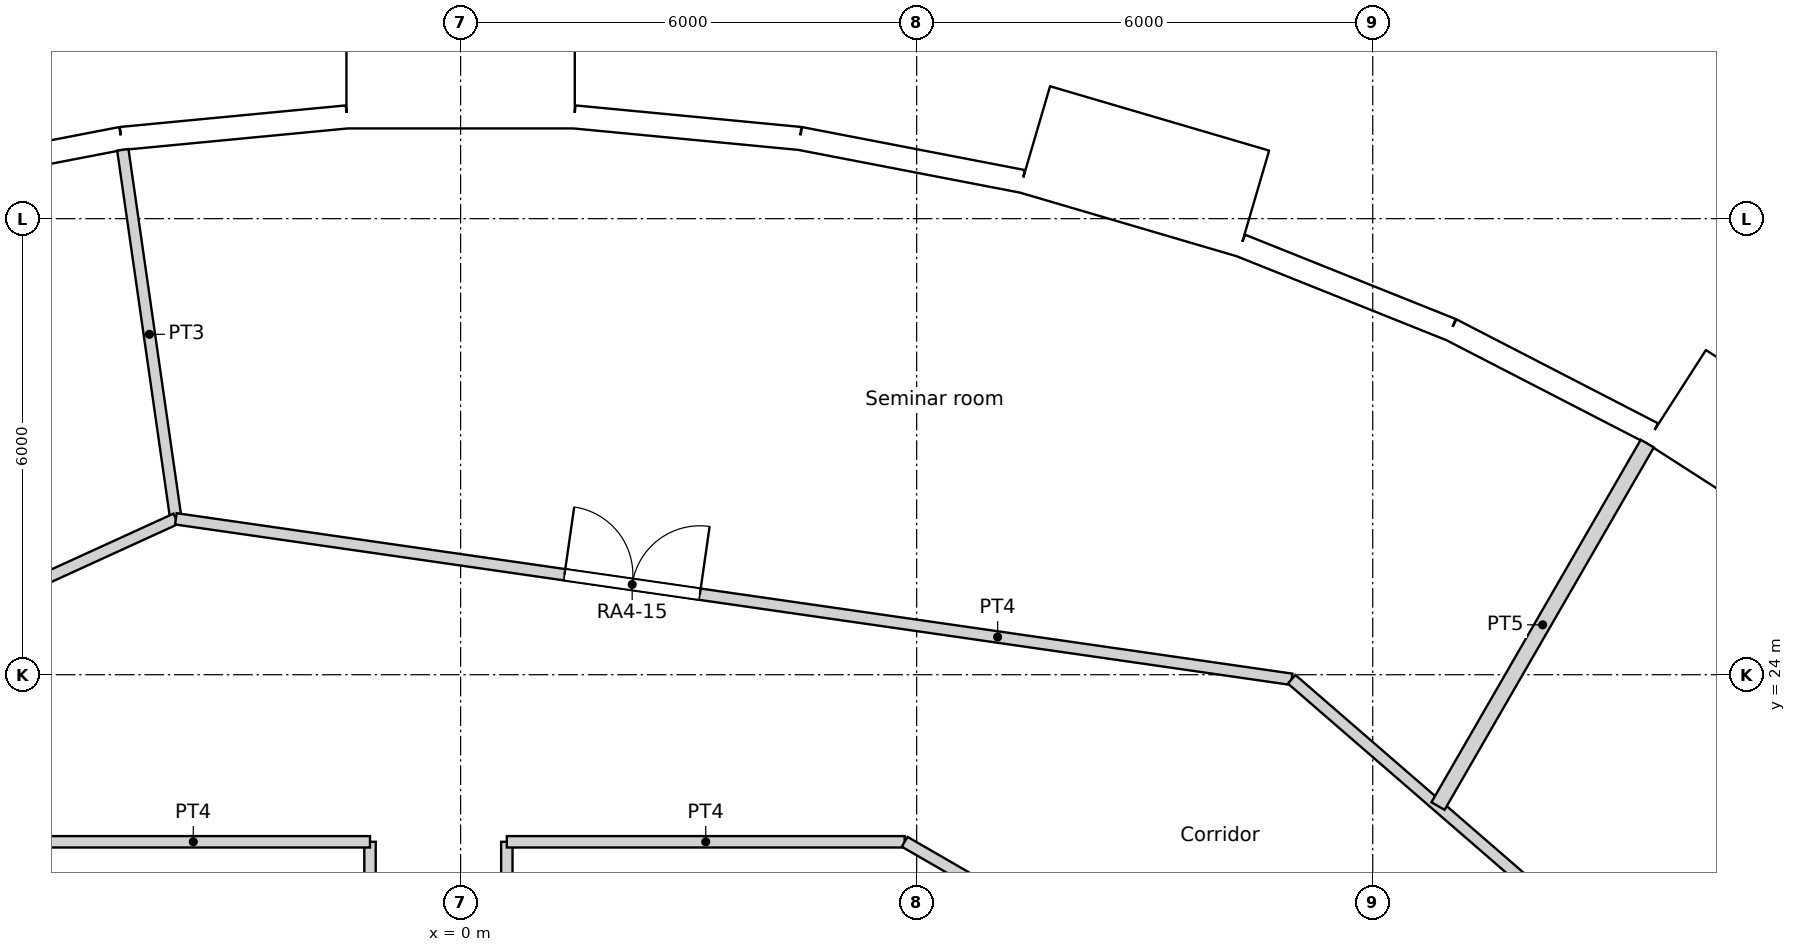
"""IFC4 building model, lengths in metres.
Left out: names, types, materials, properties, quantities, classifications, styles, units other than length and angle.
Written with IfcOpenShell. Run it as: python <this file> out.ifc"""

import sys

from ifc_helpers import new_model, si_unit, direction, frame, frame_2d, origin, origin_2d, place, context, subcontext, project, spatial, rectangle, circle, extrude, element, fill, save


model = new_model("IFC4")
c1 = context("Model", 3, precision=1e-05, world=origin(), true_north=direction((0.0, 1.0)))
c2 = subcontext(c1, "Body", "Model", "MODEL_VIEW")
j1 = project(units=[si_unit("LENGTHUNIT", "METRE"), si_unit("PLANEANGLEUNIT", "RADIAN")], contexts=[c1])
p1 = place(None, origin())
s1 = spatial("IfcSite", under=j1, at=p1, CompositionType="ELEMENT")
p2 = place(p1, origin())
s2 = spatial("IfcBuilding", under=s1, at=p2, CompositionType="ELEMENT")
p3 = place(p2, frame((0.0, 0.0, 60.6)))
s3 = spatial("IfcBuildingStorey", under=s2, at=p3, CompositionType="ELEMENT", Elevation=60.6)
for number, where, z_axis, x_axis in (
    (1, (12.576, 27.539, 0.0), (0.0, 0.0, 1.0), (1.0, 0.0, 0.0)),
    (2, (7.137, 29.421, 0.0), (0.0, 0.0, 1.0), (1.0, 0.0, 0.0)),
    (3, (1.44, 30.24, 0.0), (0.0, 0.0, 1.0), (1.0, 0.0, 0.0)),
    (4, (-4.309, 29.966, 0.0), (0.0, 0.0, 1.0), (1.0, 0.0, 0.0)),
):
    element("IfcColumn", number, at=place(p3, frame(where, z_axis=z_axis, x_axis=x_axis)), inside=s3, PredefinedType="COLUMN", context=c2, shape_type="SweptSolid", body=[
        extrude(circle(Radius=0.7, at=origin_2d()), origin(), (0.0, 0.0, 1.0), 3.6),
    ])
for number, where, z_axis, x_axis in (
    (5, (9.723, 22.54, 0.0), (0.0, 0.0, 1.0), (1.0, 0.0, 0.0)),
    (6, (4.263, 24.175, 0.0), (0.0, 0.0, 1.0), (1.0, 0.0, 0.0)),
    (7, (-1.427, 24.506, 0.0), (0.0, 0.0, 1.0), (1.0, 0.0, 0.0)),
):
    element("IfcColumn", number, at=place(p3, frame(where, z_axis=z_axis, x_axis=x_axis)), inside=s3, PredefinedType="COLUMN", context=c2, shape_type="SweptSolid", body=[
        extrude(circle(Radius=0.75, at=origin_2d()), origin(), (0.0, 0.0, 1.0), 3.6),
    ])
p4 = place(p3, frame((18.516, 26.037, -0.45), z_axis=(0.0, 0.0, 1.0), x_axis=(-0.841223422347, 0.540687667415, 0.0)))
e8 = element("IfcWall", 8, at=p4, inside=s3, PredefinedType="ELEMENTEDWALL", context=c2, shape_type="SweptSolid", body=[
    extrude(rectangle(XDim=3.0, YDim=1.45, at=frame_2d((1.5, 0.0))), origin(), (0.0, 0.0, 1.0), 3.6),
])
p5 = place(p4, frame((1.5, 0.0, 2.0)))
e9 = element("IfcOpeningElement", 9, at=p5, cuts=e8, PredefinedType="OPENING", context=c2, shape_type="SweptSolid", body=[
    extrude(circle(Radius=0.9, at=origin_2d()), frame((0.0, 0.735, 0.0), z_axis=(0.0, -1.0, 0.0), x_axis=(1.0, 0.0, 0.0)), (0.0, 0.0, 1.0), 1.47),
])
p6 = place(p3, frame((15.682, 27.174, 0.0), z_axis=(0.0, 0.0, 1.0), x_axis=(-0.888819853856, 0.458256770153, 0.0)))
e10 = element("IfcWall", 10, at=p6, inside=s3, PredefinedType="SOLIDWALL", context=c2, shape_type="SweptSolid", body=[
    extrude(rectangle(XDim=2.98, YDim=0.3, at=frame_2d((1.49, 0.0))), origin(), (0.0, 0.0, 1.0), 2.65),
])
p7 = place(p6, frame((1.49, 0.0, 1.55)))
e11 = element("IfcOpeningElement", 11, at=p7, cuts=e10, PredefinedType="OPENING", context=c2, shape_type="SweptSolid", body=[
    extrude(circle(Radius=0.9, at=origin_2d()), frame((0.0, 0.16, 0.0), z_axis=(0.0, -1.0, 0.0), x_axis=(1.0, 0.0, 0.0)), (0.0, 0.0, 1.0), 0.32),
])
p8 = place(p3, frame((13.033, 28.539, 0.0), z_axis=(0.0, 0.0, 1.0), x_axis=(-0.928403213937, 0.371574316054, 0.0)))
e12 = element("IfcWall", 12, at=p8, inside=s3, PredefinedType="SOLIDWALL", context=c2, shape_type="SweptSolid", body=[
    extrude(rectangle(XDim=2.98, YDim=0.3, at=frame_2d((1.49, 0.0))), origin(), (0.0, 0.0, 1.0), 3.15),
])
p9 = place(p8, frame((1.49, 0.0, 1.55)))
e13 = element("IfcOpeningElement", 13, at=p9, cuts=e12, PredefinedType="OPENING", context=c2, shape_type="SweptSolid", body=[
    extrude(circle(Radius=0.9, at=origin_2d()), frame((0.0, 0.16, 0.0), z_axis=(0.0, -1.0, 0.0), x_axis=(1.0, 0.0, 0.0)), (0.0, 0.0, 1.0), 0.32),
])
p10 = place(p3, frame((10.43, 30.198, -0.45), z_axis=(0.0, 0.0, 1.0), x_axis=(-0.959489813418, 0.281743319258, 0.0)))
e14 = element("IfcWall", 14, at=p10, inside=s3, PredefinedType="ELEMENTEDWALL", context=c2, shape_type="SweptSolid", body=[
    extrude(rectangle(XDim=3.0, YDim=1.45, at=frame_2d((1.5, 0.0))), origin(), (0.0, 0.0, 1.0), 3.6),
])
p11 = place(p10, frame((1.5, 0.0, 2.0)))
e15 = element("IfcOpeningElement", 15, at=p11, cuts=e14, PredefinedType="OPENING", context=c2, shape_type="SweptSolid", body=[
    extrude(circle(Radius=0.9, at=origin_2d()), frame((0.0, 0.735, 0.0), z_axis=(0.0, -1.0, 0.0), x_axis=(1.0, 0.0, 0.0)), (0.0, 0.0, 1.0), 1.47),
])
p12 = place(p3, frame((7.391, 30.491, 0.0), z_axis=(0.0, 0.0, 1.0), x_axis=(-0.981924535406, 0.189272836848, 0.0)))
e16 = element("IfcWall", 16, at=p12, inside=s3, PredefinedType="SOLIDWALL", context=c2, shape_type="SweptSolid", body=[
    extrude(rectangle(XDim=2.98, YDim=0.3, at=frame_2d((1.49, 0.0))), origin(), (0.0, 0.0, 1.0), 2.65),
])
p13 = place(p12, frame((1.49, 0.0, 1.55)))
e17 = element("IfcOpeningElement", 17, at=p13, cuts=e16, PredefinedType="OPENING", context=c2, shape_type="SweptSolid", body=[
    extrude(circle(Radius=0.9, at=origin_2d()), frame((0.0, 0.16, 0.0), z_axis=(0.0, -1.0, 0.0), x_axis=(1.0, 0.0, 0.0)), (0.0, 0.0, 1.0), 0.32),
])
p14 = place(p3, frame((4.465, 31.055, 0.0), z_axis=(0.0, 0.0, 1.0), x_axis=(-0.995473351551, 0.095041077185, 0.0)))
e18 = element("IfcWall", 18, at=p14, inside=s3, PredefinedType="SOLIDWALL", context=c2, shape_type="SweptSolid", body=[
    extrude(rectangle(XDim=2.98, YDim=0.3, at=frame_2d((1.49, 0.0))), origin(), (0.0, 0.0, 1.0), 3.15),
])
p15 = place(p14, frame((1.49, 0.0, 1.55)))
e19 = element("IfcOpeningElement", 19, at=p15, cuts=e18, PredefinedType="OPENING", context=c2, shape_type="SweptSolid", body=[
    extrude(circle(Radius=0.9, at=origin_2d()), frame((0.0, 0.16, 0.0), z_axis=(0.0, -1.0, 0.0), x_axis=(1.0, 0.0, 0.0)), (0.0, 0.0, 1.0), 0.32),
])
p16 = place(p3, frame((1.5, 31.914, -0.45), z_axis=(0.0, 0.0, 1.0), x_axis=(-1.0, 0.0, 0.0)))
e20 = element("IfcWall", 20, at=p16, inside=s3, PredefinedType="ELEMENTEDWALL", context=c2, shape_type="SweptSolid", body=[
    extrude(rectangle(XDim=3.0, YDim=1.45, at=frame_2d((1.5, 0.0))), origin(), (0.0, 0.0, 1.0), 3.6),
])
p17 = place(p16, frame((1.5, 0.0, 2.0)))
e21 = element("IfcOpeningElement", 21, at=p17, cuts=e20, PredefinedType="OPENING", context=c2, shape_type="SweptSolid", body=[
    extrude(circle(Radius=0.9, at=origin_2d()), frame((0.0, 0.735, 0.0), z_axis=(0.0, -1.0, 0.0), x_axis=(1.0, 0.0, 0.0)), (0.0, 0.0, 1.0), 1.47),
])
p18 = place(p3, frame((-1.499, 31.338, 0.0), z_axis=(0.0, 0.0, 1.0), x_axis=(-0.995473351551, -0.095041077185, 0.0)))
e22 = element("IfcWall", 22, at=p18, inside=s3, PredefinedType="SOLIDWALL", context=c2, shape_type="SweptSolid", body=[
    extrude(rectangle(XDim=2.98, YDim=0.3, at=frame_2d((1.49, 0.0))), origin(), (0.0, 0.0, 1.0), 2.65),
])
p19 = place(p18, frame((1.49, 0.0, 1.55)))
e23 = element("IfcOpeningElement", 23, at=p19, cuts=e22, PredefinedType="OPENING", context=c2, shape_type="SweptSolid", body=[
    extrude(circle(Radius=0.9, at=origin_2d()), frame((0.0, 0.16, 0.0), z_axis=(0.0, -1.0, 0.0), x_axis=(1.0, 0.0, 0.0)), (0.0, 0.0, 1.0), 0.32),
])
p20 = place(p3, frame((-4.465, 31.055, 0.0), z_axis=(0.0, 0.0, 1.0), x_axis=(-0.981924535406, -0.189272836848, 0.0)))
e24 = element("IfcWall", 24, at=p20, inside=s3, PredefinedType="SOLIDWALL", context=c2, shape_type="SweptSolid", body=[
    extrude(rectangle(XDim=2.98, YDim=0.3, at=frame_2d((1.49, 0.0))), origin(), (0.0, 0.0, 1.0), 3.15),
])
p21 = place(p20, frame((1.49, 0.0, 1.55)))
e25 = element("IfcOpeningElement", 25, at=p21, cuts=e24, PredefinedType="OPENING", context=c2, shape_type="SweptSolid", body=[
    extrude(circle(Radius=0.9, at=origin_2d()), frame((0.0, 0.16, 0.0), z_axis=(0.0, -1.0, 0.0), x_axis=(1.0, 0.0, 0.0)), (0.0, 0.0, 1.0), 0.32),
])
p22 = place(p3, frame((10.933, 23.94, 0.0), z_axis=(0.0, 0.0, 1.0), x_axis=(0.755770011705, -0.654837147242, 0.0)))
e26 = element("IfcWall", 26, at=p22, inside=s3, PredefinedType="PARTITIONING", context=c2, shape_type="SweptSolid", body=[
    extrude(rectangle(XDim=14.83, YDim=0.15, at=frame_2d((7.415, 0.0))), origin(), (0.0, 0.0, 1.0), 3.15),
])
p23 = place(p22, frame((6.807, 0.0, 0.0)))
e27 = element("IfcOpeningElement", 27, at=p23, cuts=e26, PredefinedType="OPENING", context=c2, shape_type="SweptSolid", body=[
    extrude(rectangle(XDim=0.95, YDim=2.1, at=frame_2d((0.475, 1.05))), frame((0.0, 0.075, 0.0), z_axis=(0.0, -1.0, 0.0), x_axis=(1.0, 0.0, 0.0)), (0.0, 0.0, 1.0), 0.15),
])
p24 = place(p3, frame((-1.192, 11.8, 0.0), z_axis=(0.0, 0.0, 1.0), x_axis=(0.0, 1.0, 0.0)))
e28 = element("IfcWall", 28, at=p24, inside=s3, PredefinedType="PARTITIONING", context=c2, shape_type="SweptSolid", body=[
    extrude(rectangle(XDim=10.002, YDim=0.15, at=frame_2d((5.001, 0.0))), origin(), (0.0, 0.0, 1.0), 3.15),
])
p25 = place(p3, frame((-5.842, 21.802, 0.0), z_axis=(0.0, 0.0, 1.0), x_axis=(1.0, 0.0, 0.0)))
e29 = element("IfcWall", 29, at=p25, inside=s3, PredefinedType="PARTITIONING", context=c2, shape_type="SweptSolid", body=[
    extrude(rectangle(XDim=4.65, YDim=0.15, at=frame_2d((2.325, 0.0))), origin(), (0.0, 0.0, 1.0), 3.15),
])
p26 = place(p3, frame((5.842, 21.802, 0.0), z_axis=(0.0, 0.0, 1.0), x_axis=(0.865983505205, -0.500072563448, 0.0)))
e30 = element("IfcWall", 30, at=p26, inside=s3, PredefinedType="PARTITIONING", context=c2, shape_type="SweptSolid", body=[
    extrude(rectangle(XDim=4.265, YDim=0.15, at=frame_2d((2.133, 0.0))), origin(), (0.0, 0.0, 1.0), 3.15),
])
p27 = place(p3, frame((0.608, 21.802, 0.0), z_axis=(0.0, 0.0, 1.0), x_axis=(1.0, 0.0, 0.0)))
e31 = element("IfcWall", 31, at=p27, inside=s3, PredefinedType="PARTITIONING", context=c2, shape_type="SweptSolid", body=[
    extrude(rectangle(XDim=5.234, YDim=0.15, at=frame_2d((2.617, 0.0))), origin(), (0.0, 0.0, 1.0), 3.15),
])
p28 = place(p3, frame((0.608, 11.8, 0.0), z_axis=(0.0, 0.0, 1.0), x_axis=(0.0, 1.0, 0.0)))
e32 = element("IfcWall", 32, at=p28, inside=s3, PredefinedType="PARTITIONING", context=c2, shape_type="SweptSolid", body=[
    extrude(rectangle(XDim=10.002, YDim=0.15, at=frame_2d((5.001, 0.0))), origin(), (0.0, 0.0, 1.0), 3.15),
])
p29 = place(p28, frame((4.526, 0.0, 0.0)))
e33 = element("IfcOpeningElement", 33, at=p29, cuts=e32, PredefinedType="OPENING", context=c2, shape_type="SweptSolid", body=[
    extrude(rectangle(XDim=0.95, YDim=2.1, at=frame_2d((0.475, 1.05))), frame((0.0, 0.075, 0.0), z_axis=(0.0, -1.0, 0.0), x_axis=(1.0, 0.0, 0.0)), (0.0, 0.0, 1.0), 0.15),
])
p30 = place(p3, frame((-3.746, 26.051, 0.0), z_axis=(0.0, 0.0, 1.0), x_axis=(0.98981637125, -0.142350100825, 0.0)))
e34 = element("IfcWall", 34, at=p30, inside=s3, PredefinedType="PARTITIONING", context=c2, shape_type="SweptSolid", body=[
    extrude(rectangle(XDim=14.83, YDim=0.15, at=frame_2d((7.415, 0.0))), origin(), (0.0, 0.0, 1.0), 3.15),
])
p31 = place(p30, frame((5.165, 0.0, 0.0)))
e35 = element("IfcOpeningElement", 35, at=p31, cuts=e34, PredefinedType="OPENING", context=c2, shape_type="SweptSolid", body=[
    extrude(rectangle(XDim=1.8, YDim=2.1, at=frame_2d((0.9, 1.05))), frame((0.0, 0.075, 0.0), z_axis=(0.0, -1.0, 0.0), x_axis=(1.0, 0.0, 0.0)), (0.0, 0.0, 1.0), 0.15),
])
p32 = place(p3, frame((-17.235, 19.89, 0.0), z_axis=(0.0, 0.0, 1.0), x_axis=(0.909599826886, 0.415485444907, 0.0)))
e36 = element("IfcWall", 36, at=p32, inside=s3, PredefinedType="PARTITIONING", context=c2, shape_type="SweptSolid", body=[
    extrude(rectangle(XDim=14.829, YDim=0.15, at=frame_2d((7.415, 0.0))), origin(), (0.0, 0.0, 1.0), 3.15),
])
p33 = place(p32, frame((8.715, 0.0, 0.0)))
e37 = element("IfcOpeningElement", 37, at=p33, cuts=e36, PredefinedType="OPENING", context=c2, shape_type="SweptSolid", body=[
    extrude(rectangle(XDim=1.0, YDim=2.04, at=frame_2d((0.5, 1.02))), frame((0.0, 0.075, 0.0), z_axis=(0.0, -1.0, 0.0), x_axis=(1.0, 0.0, 0.0)), (0.0, 0.0, 1.0), 0.15),
])
p34 = place(p32, frame((2.029, 0.0, 0.0)))
e38 = element("IfcOpeningElement", 38, at=p34, cuts=e36, PredefinedType="OPENING", context=c2, shape_type="SweptSolid", body=[
    extrude(rectangle(XDim=0.95, YDim=2.1, at=frame_2d((0.475, 1.05))), frame((0.0, 0.075, 0.0), z_axis=(0.0, -1.0, 0.0), x_axis=(1.0, 0.0, 0.0)), (0.0, 0.0, 1.0), 0.15),
])
p35 = place(p3, frame((12.859, 22.272, 0.0), z_axis=(0.0, 0.0, 1.0), x_axis=(0.499968073049, 0.866043836033, 0.0)))
e39 = element("IfcWall", 39, at=p35, inside=s3, PredefinedType="PARTITIONING", context=c2, shape_type="SweptSolid", body=[
    extrude(rectangle(XDim=5.507, YDim=0.2, at=frame_2d((2.753, 0.0))), origin(), (0.0, 0.0, 1.0), 3.15),
])
p36 = place(p3, frame((-4.444, 30.906, 0.0), z_axis=(0.0, 0.0, 1.0), x_axis=(0.142306296561, -0.989822669956, 0.0)))
e40 = element("IfcWall", 40, at=p36, inside=s3, PredefinedType="PARTITIONING", context=c2, shape_type="SweptSolid", body=[
    extrude(rectangle(XDim=4.905, YDim=0.15, at=frame_2d((2.452, 0.0))), origin(), (0.0, 0.0, 1.0), 3.15),
])
p37 = place(p5, origin())
e41 = element("IfcWindow", 41, at=p37, inside=s3, PartitioningType="SINGLE_PANEL", PredefinedType="WINDOW", context=c2, shape_type="SweptSolid", body=[
    extrude(circle(Radius=0.9, at=origin_2d()), frame((0.0, 0.695, 0.0), z_axis=(0.0, -1.0, 0.0), x_axis=(1.0, 0.0, 0.0)), (0.0, 0.0, 1.0), 0.1),
])
fill(e9, e41)
p38 = place(p7, origin())
e42 = element("IfcWindow", 42, at=p38, inside=s3, PartitioningType="SINGLE_PANEL", PredefinedType="WINDOW", context=c2, shape_type="SweptSolid", body=[
    extrude(circle(Radius=0.9, at=origin_2d()), frame((0.0, 0.12, 0.0), z_axis=(0.0, -1.0, 0.0), x_axis=(1.0, 0.0, 0.0)), (0.0, 0.0, 1.0), 0.1),
])
fill(e11, e42)
p39 = place(p9, origin())
e43 = element("IfcWindow", 43, at=p39, inside=s3, PartitioningType="SINGLE_PANEL", PredefinedType="WINDOW", context=c2, shape_type="SweptSolid", body=[
    extrude(circle(Radius=0.9, at=origin_2d()), frame((0.0, 0.12, 0.0), z_axis=(0.0, -1.0, 0.0), x_axis=(1.0, 0.0, 0.0)), (0.0, 0.0, 1.0), 0.1),
])
fill(e13, e43)
p40 = place(p11, origin())
e44 = element("IfcWindow", 44, at=p40, inside=s3, PartitioningType="SINGLE_PANEL", PredefinedType="WINDOW", context=c2, shape_type="SweptSolid", body=[
    extrude(circle(Radius=0.9, at=origin_2d()), frame((0.0, 0.695, 0.0), z_axis=(0.0, -1.0, 0.0), x_axis=(1.0, 0.0, 0.0)), (0.0, 0.0, 1.0), 0.1),
])
fill(e15, e44)
p41 = place(p13, origin())
e45 = element("IfcWindow", 45, at=p41, inside=s3, PartitioningType="SINGLE_PANEL", PredefinedType="WINDOW", context=c2, shape_type="SweptSolid", body=[
    extrude(circle(Radius=0.9, at=origin_2d()), frame((0.0, 0.12, 0.0), z_axis=(0.0, -1.0, 0.0), x_axis=(1.0, 0.0, 0.0)), (0.0, 0.0, 1.0), 0.1),
])
fill(e17, e45)
p42 = place(p15, origin())
e46 = element("IfcWindow", 46, at=p42, inside=s3, PartitioningType="SINGLE_PANEL", PredefinedType="WINDOW", context=c2, shape_type="SweptSolid", body=[
    extrude(circle(Radius=0.9, at=origin_2d()), frame((0.0, 0.12, 0.0), z_axis=(0.0, -1.0, 0.0), x_axis=(1.0, 0.0, 0.0)), (0.0, 0.0, 1.0), 0.1),
])
fill(e19, e46)
p43 = place(p17, origin())
e47 = element("IfcWindow", 47, at=p43, inside=s3, PartitioningType="SINGLE_PANEL", PredefinedType="WINDOW", context=c2, shape_type="SweptSolid", body=[
    extrude(circle(Radius=0.9, at=origin_2d()), frame((0.0, 0.695, 0.0), z_axis=(0.0, -1.0, 0.0), x_axis=(1.0, 0.0, 0.0)), (0.0, 0.0, 1.0), 0.1),
])
fill(e21, e47)
p44 = place(p19, origin())
e48 = element("IfcWindow", 48, at=p44, inside=s3, PartitioningType="SINGLE_PANEL", PredefinedType="WINDOW", context=c2, shape_type="SweptSolid", body=[
    extrude(circle(Radius=0.9, at=origin_2d()), frame((0.0, 0.12, 0.0), z_axis=(0.0, -1.0, 0.0), x_axis=(1.0, 0.0, 0.0)), (0.0, 0.0, 1.0), 0.1),
])
fill(e23, e48)
p45 = place(p21, origin())
e49 = element("IfcWindow", 49, at=p45, inside=s3, PartitioningType="SINGLE_PANEL", PredefinedType="WINDOW", context=c2, shape_type="SweptSolid", body=[
    extrude(circle(Radius=0.9, at=origin_2d()), frame((0.0, 0.12, 0.0), z_axis=(0.0, -1.0, 0.0), x_axis=(1.0, 0.0, 0.0)), (0.0, 0.0, 1.0), 0.1),
])
fill(e25, e49)
p46 = place(p31, origin())
e50 = element("IfcDoor", 50, at=p46, inside=s3, OperationType="DOUBLE_DOOR_SINGLE_SWING", PredefinedType="DOOR", context=c2, shape_type="SweptSolid", body=[
    extrude(rectangle(XDim=1.8, YDim=2.1, at=frame_2d((0.9, 1.05))), frame((0.0, 0.025, 0.0), z_axis=(0.0, -1.0, 0.0), x_axis=(1.0, 0.0, 0.0)), (0.0, 0.0, 1.0), 0.05),
])
fill(e35, e50)
save(model, sys.argv[1])
